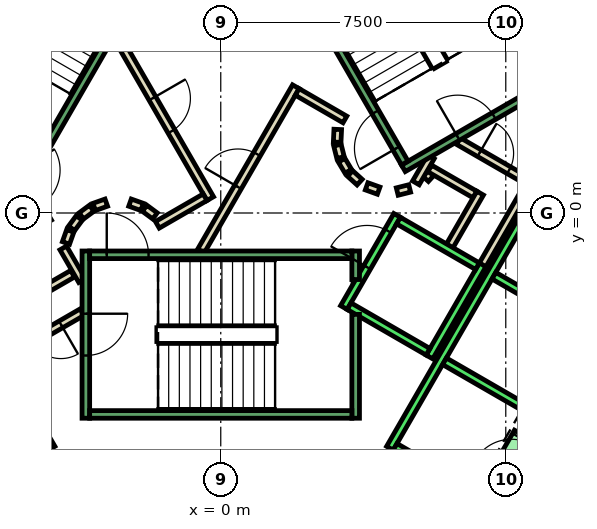
"""IFC4 building model, lengths in metres.
Left out: names, types, materials, properties, quantities, classifications, styles, units other than length and angle.
Written with IfcOpenShell. Run it as: python <this file> out.ifc"""

import sys

from ifc_helpers import new_model, si_unit, direction, frame, frame_2d, origin, place, context, subcontext, project, spatial, polyline, rectangle, outline, extrude, element, fill, save


model = new_model("IFC4")
c1 = context("Model", 3, precision=1e-05, world=origin(), true_north=direction((0.0, 1.0)))
c2 = subcontext(c1, "Body", "Model", "MODEL_VIEW")
j1 = project(units=[si_unit("LENGTHUNIT", "METRE"), si_unit("PLANEANGLEUNIT", "RADIAN")], contexts=[c1])
p1 = place(None, origin())
s1 = spatial("IfcSite", under=j1, at=p1, CompositionType="ELEMENT")
p2 = place(p1, origin())
s2 = spatial("IfcBuilding", under=s1, at=p2, CompositionType="ELEMENT")
p3 = place(p2, frame((0.0, 0.0, 138.2)))
s3 = spatial("IfcBuildingStorey", under=s2, at=p3, CompositionType="ELEMENT", Elevation=138.2)
p4 = place(p3, frame((0.0, 0.0, 3.6)))
e1 = element("IfcWall", 1, at=p4, inside=s3, PredefinedType="SHEAR", context=c2, shape_type="SweptSolid", body=[
    extrude(outline(polyline([(8.767, -6.314), (8.075, -5.914), (7.424, -7.04), (8.117, -7.44), (8.767, -6.314)])), origin(), (0.0, 0.0, 1.0), 0.2),
])
p5 = place(p3, frame((5.39, 0.898, 0.0), z_axis=(0.0, 0.0, 1.0), x_axis=(0.673828488714, 0.738887791073, 0.0)))
e2 = element("IfcWall", 2, at=p5, inside=s3, PredefinedType="PARTITIONING", context=c2, shape_type="SweptSolid", body=[
    extrude(rectangle(XDim=0.263, YDim=0.2, at=frame_2d((0.131, 0.0))), origin(), (0.0, 0.0, 1.0), 3.8),
])
p6 = place(p3, frame((5.499, 1.172, 0.0), z_axis=(0.0, 0.0, 1.0), x_axis=(0.866333505267, -0.499465972466, 0.0)))
e3 = element("IfcWall", 3, at=p6, inside=s3, PredefinedType="PARTITIONING", context=c2, shape_type="SweptSolid", body=[
    extrude(rectangle(XDim=1.374, YDim=0.2, at=frame_2d((0.687, 0.0))), origin(), (0.0, 0.0, 1.0), 3.8),
])
p7 = place(p3, frame((6.826, 0.522, 0.0), z_axis=(0.0, 0.0, 1.0), x_axis=(-0.500016722714, -0.866015748706, 0.0)))
e4 = element("IfcWall", 4, at=p7, inside=s3, PredefinedType="PARTITIONING", context=c2, shape_type="SweptSolid", body=[
    extrude(rectangle(XDim=1.7, YDim=0.2, at=frame_2d((0.85, 0.0))), origin(), (0.0, 0.0, 1.0), 3.8),
])
p8 = place(p3, frame((6.25, 1.894, 0.0), z_axis=(0.0, 0.0, 1.0), x_axis=(0.866043184279, -0.499969202016, 0.0)))
e5 = element("IfcWall", 5, at=p8, inside=s3, PredefinedType="PARTITIONING", context=c2, shape_type="SweptSolid", body=[
    extrude(rectangle(XDim=2.084, YDim=0.2, at=frame_2d((1.042, 0.0))), origin(), (0.0, 0.0, 1.0), 3.8),
])
p9 = place(p8, frame((0.642, 0.0, 0.0)))
e6 = element("IfcOpeningElement", 6, at=p9, cuts=e5, PredefinedType="OPENING", context=c2, shape_type="SweptSolid", body=[
    extrude(rectangle(XDim=0.9, YDim=2.1, at=frame_2d((0.45, 1.05))), frame((0.0, 0.11, 0.0), z_axis=(0.0, -1.0, 0.0), x_axis=(1.0, 0.0, 0.0)), (0.0, 0.0, 1.0), 0.22),
])
p10 = place(p3, frame((8.192, 0.888, 0.0), z_axis=(0.0, 0.0, 1.0), x_axis=(-0.499940625693, -0.866059680843, 0.0)))
e7 = element("IfcWall", 7, at=p10, inside=s3, PredefinedType="PARTITIONING", context=c2, shape_type="SweptSolid", body=[
    extrude(rectangle(XDim=2.68, YDim=0.2, at=frame_2d((1.34, 0.0))), origin(), (0.0, 0.0, 1.0), 3.8),
])
p11 = place(p3, frame((5.135, 0.793, 0.0), z_axis=(0.0, 0.0, 1.0), x_axis=(0.499526442893, 0.866298639529, 0.0)))
e8 = element("IfcWall", 8, at=p11, inside=s3, PredefinedType="PARTITIONING", context=c2, shape_type="SweptSolid", body=[
    extrude(rectangle(XDim=0.791, YDim=0.2, at=frame_2d((0.396, 0.0))), origin(), (0.0, 0.0, 1.0), 3.8),
])
p12 = place(p3, frame((-3.9, -1.599, 0.0), z_axis=(0.0, 0.0, 1.0), x_axis=(-0.865969445389, -0.500096910261, 0.0)))
e9 = element("IfcWall", 9, at=p12, inside=s3, PredefinedType="PARTITIONING", context=c2, shape_type="SweptSolid", body=[
    extrude(rectangle(XDim=1.373, YDim=0.2, at=frame_2d((0.687, 0.0))), origin(), (0.0, 0.0, 1.0), 3.8),
])
p13 = place(p3, frame((-3.65, -2.61, 0.0), z_axis=(0.0, 0.0, 1.0), x_axis=(-0.866072462134, -0.499918483688, 0.0)))
e10 = element("IfcWall", 10, at=p13, inside=s3, PredefinedType="PARTITIONING", context=c2, shape_type="SweptSolid", body=[
    extrude(rectangle(XDim=2.084, YDim=0.2, at=frame_2d((1.042, 0.0))), origin(), (0.0, 0.0, 1.0), 3.8),
])
p14 = place(p13, frame((0.642, 0.0, 0.0)))
e11 = element("IfcOpeningElement", 11, at=p14, cuts=e10, PredefinedType="OPENING", context=c2, shape_type="SweptSolid", body=[
    extrude(rectangle(XDim=0.9, YDim=2.1, at=frame_2d((0.45, 1.05))), frame((0.0, 0.11, 0.0), z_axis=(0.0, -1.0, 0.0), x_axis=(1.0, 0.0, 0.0)), (0.0, 0.0, 1.0), 0.22),
])
p15 = place(p3, frame((-4.145, -0.92, 0.0), z_axis=(0.0, 0.0, 1.0), x_axis=(0.499743786207, -0.866173278362, 0.0)))
e12 = element("IfcWall", 12, at=p15, inside=s3, PredefinedType="PARTITIONING", context=c2, shape_type="SweptSolid", body=[
    extrude(rectangle(XDim=0.991, YDim=0.2, at=frame_2d((0.495, 0.0))), origin(), (0.0, 0.0, 1.0), 3.8),
])
p16 = place(p3, frame((-0.52, -1.0, 0.0), z_axis=(0.0, 0.0, 1.0), x_axis=(0.50011622646, 0.865958290007, 0.0)))
e13 = element("IfcWall", 13, at=p16, inside=s3, PredefinedType="PARTITIONING", context=c2, shape_type="SweptSolid", body=[
    extrude(rectangle(XDim=4.991, YDim=0.2, at=frame_2d((2.496, 0.0))), origin(), (0.0, 0.0, 1.0), 3.8),
])
p17 = place(p16, frame((1.945, 0.0, 0.0)))
e14 = element("IfcOpeningElement", 14, at=p17, cuts=e13, PredefinedType="OPENING", context=c2, shape_type="SweptSolid", body=[
    extrude(rectangle(XDim=1.0, YDim=2.1, at=frame_2d((0.5, 1.05))), frame((0.0, 0.11, 0.0), z_axis=(0.0, -1.0, 0.0), x_axis=(1.0, 0.0, 0.0)), (0.0, 0.0, 1.0), 0.22),
])
p18 = place(p3, frame((2.012, 3.186, 0.0), z_axis=(0.0, 0.0, 1.0), x_axis=(0.865891012941, -0.500232699559, 0.0)))
e15 = element("IfcWall", 15, at=p18, inside=s3, PredefinedType="PARTITIONING", context=c2, shape_type="SweptSolid", body=[
    extrude(rectangle(XDim=1.449, YDim=0.2, at=frame_2d((0.725, 0.0))), origin(), (0.0, 0.0, 1.0), 3.8),
])
p19 = place(p3, frame((3.079, 2.199, 0.0), z_axis=(0.0, 0.0, 1.0), x_axis=(-0.047771483479, -0.998858290933, 0.0)))
e16 = element("IfcWall", 16, at=p19, inside=s3, PredefinedType="PARTITIONING", context=c2, shape_type="SweptSolid", body=[
    extrude(rectangle(XDim=0.337, YDim=0.2, at=frame_2d((0.169, 0.0))), origin(), (0.0, 0.0, 1.0), 3.8),
])
p20 = place(p3, frame((3.07, 1.786, 0.0), z_axis=(0.0, 0.0, 1.0), x_axis=(0.242705583207, -0.970099994784, 0.0)))
e17 = element("IfcWall", 17, at=p20, inside=s3, PredefinedType="PARTITIONING", context=c2, shape_type="SweptSolid", body=[
    extrude(rectangle(XDim=0.338, YDim=0.2, at=frame_2d((0.169, 0.0))), origin(), (0.0, 0.0, 1.0), 3.8),
])
for number, where, z_axis, x_axis in (
    (18, (3.182, 1.388, 0.0), (0.0, 0.0, 1.0), (0.512, -0.859, 0.0)),
    (19, (3.404, 1.039, 0.0), (0.0, 0.0, 1.0), (0.74, -0.672, 0.0)),
):
    element("IfcWall", number, at=place(p3, frame(where, z_axis=z_axis, x_axis=x_axis)), inside=s3, PredefinedType="PARTITIONING", context=c2, shape_type="SweptSolid", body=[
        extrude(rectangle(XDim=0.338, YDim=0.2, at=frame_2d((0.169, 0.0))), origin(), (0.0, 0.0, 1.0), 3.8),
    ])
p21 = place(p3, frame((3.838, 0.702, 0.0), z_axis=(0.0, 0.0, 1.0), x_axis=(0.941035081519, -0.338308993895, 0.0)))
e20 = element("IfcWall", 20, at=p21, inside=s3, PredefinedType="PARTITIONING", context=c2, shape_type="SweptSolid", body=[
    extrude(rectangle(XDim=0.337, YDim=0.2, at=frame_2d((0.168, 0.0))), origin(), (0.0, 0.0, 1.0), 3.8),
])
p22 = place(p3, frame((4.644, 0.564, 0.0), z_axis=(0.0, 0.0, 1.0), x_axis=(0.969929076366, 0.243387729394, 0.0)))
e21 = element("IfcWall", 21, at=p22, inside=s3, PredefinedType="PARTITIONING", context=c2, shape_type="SweptSolid", body=[
    extrude(rectangle(XDim=0.337, YDim=0.2, at=frame_2d((0.168, 0.0))), origin(), (0.0, 0.0, 1.0), 3.8),
])
p23 = place(p3, frame((-2.771, 4.7, 0.0), z_axis=(0.0, 0.0, 1.0), x_axis=(0.499969479948, -0.866043023828, 0.0)))
e22 = element("IfcWall", 22, at=p23, inside=s3, PredefinedType="PARTITIONING", context=c2, shape_type="SweptSolid", body=[
    extrude(rectangle(XDim=4.99, YDim=0.2, at=frame_2d((2.495, 0.0))), origin(), (0.0, 0.0, 1.0), 3.8),
])
p24 = place(p23, frame((1.945, 0.0, 0.0)))
e23 = element("IfcOpeningElement", 23, at=p24, cuts=e22, PredefinedType="OPENING", context=c2, shape_type="SweptSolid", body=[
    extrude(rectangle(XDim=1.0, YDim=2.1, at=frame_2d((0.5, 1.05))), frame((0.0, 0.11, 0.0), z_axis=(0.0, -1.0, 0.0), x_axis=(1.0, 0.0, 0.0)), (0.0, 0.0, 1.0), 0.22),
])
p25 = place(p3, frame((-0.412, 0.414, 0.0), z_axis=(0.0, 0.0, 1.0), x_axis=(-0.866017369001, -0.500013916395, 0.0)))
e24 = element("IfcWall", 24, at=p25, inside=s3, PredefinedType="PARTITIONING", context=c2, shape_type="SweptSolid", body=[
    extrude(rectangle(XDim=1.45, YDim=0.2, at=frame_2d((0.725, 0.0))), origin(), (0.0, 0.0, 1.0), 3.8),
])
p26 = place(p3, frame((-1.731, -0.077, 0.0), z_axis=(0.0, 0.0, 1.0), x_axis=(-0.804311165252, 0.594208338422, 0.0)))
e25 = element("IfcWall", 25, at=p26, inside=s3, PredefinedType="PARTITIONING", context=c2, shape_type="SweptSolid", body=[
    extrude(rectangle(XDim=0.338, YDim=0.2, at=frame_2d((0.169, 0.0))), origin(), (0.0, 0.0, 1.0), 3.8),
])
p27 = place(p3, frame((-2.07, 0.16, 0.0), z_axis=(0.0, 0.0, 1.0), x_axis=(-0.942199461132, 0.335052496547, 0.0)))
e26 = element("IfcWall", 26, at=p27, inside=s3, PredefinedType="PARTITIONING", context=c2, shape_type="SweptSolid", body=[
    extrude(rectangle(XDim=0.337, YDim=0.2, at=frame_2d((0.169, 0.0))), origin(), (0.0, 0.0, 1.0), 3.8),
])
p28 = place(p3, frame((-3.012, 0.273, 0.0), z_axis=(0.0, 0.0, 1.0), x_axis=(-0.942280615813, -0.334824194261, 0.0)))
e27 = element("IfcWall", 27, at=p28, inside=s3, PredefinedType="PARTITIONING", context=c2, shape_type="SweptSolid", body=[
    extrude(rectangle(XDim=0.338, YDim=0.2, at=frame_2d((0.169, 0.0))), origin(), (0.0, 0.0, 1.0), 3.8),
])
p29 = place(p3, frame((-3.397, 0.124, 0.0), z_axis=(0.0, 0.0, 1.0), x_axis=(-0.804311165252, -0.594208338422, 0.0)))
e28 = element("IfcWall", 28, at=p29, inside=s3, PredefinedType="PARTITIONING", context=c2, shape_type="SweptSolid", body=[
    extrude(rectangle(XDim=0.338, YDim=0.2, at=frame_2d((0.169, 0.0))), origin(), (0.0, 0.0, 1.0), 3.8),
])
p30 = place(p3, frame((-3.723, -0.131, 0.0), z_axis=(0.0, 0.0, 1.0), x_axis=(-0.594675113454, -0.803966112121, 0.0)))
e29 = element("IfcWall", 29, at=p30, inside=s3, PredefinedType="PARTITIONING", context=c2, shape_type="SweptSolid", body=[
    extrude(rectangle(XDim=0.338, YDim=0.2, at=frame_2d((0.169, 0.0))), origin(), (0.0, 0.0, 1.0), 3.8),
])
p31 = place(p3, frame((-3.96, -0.47, 0.0), z_axis=(0.0, 0.0, 1.0), x_axis=(-0.334824194261, -0.942280615813, 0.0)))
e30 = element("IfcWall", 30, at=p31, inside=s3, PredefinedType="PARTITIONING", context=c2, shape_type="SweptSolid", body=[
    extrude(rectangle(XDim=0.338, YDim=0.2, at=frame_2d((0.169, 0.0))), origin(), (0.0, 0.0, 1.0), 3.8),
])
p32 = place(p3, frame((-9.751, 2.99, 0.0), z_axis=(0.0, 0.0, 1.0), x_axis=(0.50000090737, -0.866024879913, 0.0)))
e31 = element("IfcWall", 31, at=p32, inside=s3, PredefinedType="STANDARD", context=c2, shape_type="SweptSolid", body=[
    extrude(rectangle(XDim=10.6, YDim=0.2, at=frame_2d((5.3, 0.0))), origin(), (0.0, 0.0, 1.0), 3.8),
])
p33 = place(p3, frame((3.24, -2.488, 0.0), z_axis=(0.0, 0.0, 1.0), x_axis=(0.49994636267, 0.866056369097, 0.0)))
e32 = element("IfcWall", 32, at=p33, inside=s3, PredefinedType="STANDARD", context=c2, shape_type="SweptSolid", body=[
    extrude(rectangle(XDim=2.8, YDim=0.2, at=frame_2d((1.4, 0.0))), origin(), (0.0, 0.0, 1.0), 3.8),
])
p34 = place(p33, frame((1.225, 0.0, 0.0)))
e33 = element("IfcOpeningElement", 33, at=p34, cuts=e32, PredefinedType="OPENING", context=c2, shape_type="SweptSolid", body=[
    extrude(rectangle(XDim=1.1, YDim=2.1, at=frame_2d((0.55, 1.05))), frame((0.0, 0.11, 0.0), z_axis=(0.0, -1.0, 0.0), x_axis=(1.0, 0.0, 0.0)), (0.0, 0.0, 1.0), 0.22),
])
p35 = place(p3, frame((5.492, -3.788, 0.0), z_axis=(0.0, 0.0, 1.0), x_axis=(0.500011755427, 0.866018616679, 0.0)))
e34 = element("IfcWall", 34, at=p35, inside=s3, PredefinedType="STANDARD", context=c2, shape_type="SweptSolid", body=[
    extrude(rectangle(XDim=2.8, YDim=0.2, at=frame_2d((1.4, 0.0))), origin(), (0.0, 0.0, 1.0), 3.8),
])
p36 = place(p3, frame((3.377, -2.452, 0.0), z_axis=(0.0, 0.0, 1.0), x_axis=(0.865955154139, -0.50012165622, 0.0)))
e35 = element("IfcWall", 35, at=p36, inside=s3, PredefinedType="STANDARD", context=c2, shape_type="SweptSolid", body=[
    extrude(rectangle(XDim=2.4, YDim=0.2, at=frame_2d((1.2, 0.0))), origin(), (0.0, 0.0, 1.0), 3.8),
])
p37 = place(p3, frame((4.677, -0.2, 0.0), z_axis=(0.0, 0.0, 1.0), x_axis=(0.865973769406, -0.500089422704, 0.0)))
e36 = element("IfcWall", 36, at=p37, inside=s3, PredefinedType="STANDARD", context=c2, shape_type="SweptSolid", body=[
    extrude(rectangle(XDim=2.399, YDim=0.2, at=frame_2d((1.2, 0.0))), origin(), (0.0, 0.0, 1.0), 3.8),
])
p38 = place(p3, frame((4.451, -6.19, 0.0), z_axis=(0.0, 0.0, 1.0), x_axis=(0.50000090737, 0.866024879913, 0.0)))
e37 = element("IfcWall", 37, at=p38, inside=s3, PredefinedType="STANDARD", context=c2, shape_type="SweptSolid", body=[
    extrude(rectangle(XDim=10.6, YDim=0.2, at=frame_2d((5.3, 0.0))), origin(), (0.0, 0.0, 1.0), 3.8),
])
for number, where, z_axis, x_axis in (
    (38, (4.588, -6.153, 0.0), (0.0, 0.0, 1.0), (0.866, -0.5, 0.0)),
    (39, (5.888, -3.902, 0.0), (0.0, 0.0, 1.0), (0.866, -0.5, 0.0)),
    (40, (7.188, -1.65, 0.0), (0.0, 0.0, 1.0), (0.866, -0.5, 0.0)),
):
    element("IfcWall", number, at=place(p3, frame(where, z_axis=z_axis, x_axis=x_axis)), inside=s3, PredefinedType="STANDARD", context=c2, shape_type="SweptSolid", body=[
        extrude(rectangle(XDim=2.5, YDim=0.2, at=frame_2d((1.25, 0.0))), origin(), (0.0, 0.0, 1.0), 3.8),
    ])
p39 = place(p3, frame((7.598, -7.14, 0.0), z_axis=(0.0, 0.0, 1.0), x_axis=(0.500362116554, 0.865816234728, 0.0)))
e41 = element("IfcWall", 41, at=p39, inside=s3, PredefinedType="STANDARD", context=c2, shape_type="SweptSolid", body=[
    extrude(rectangle(XDim=1.299, YDim=1.2, at=frame_2d((0.65, 0.0))), origin(), (0.0, 0.0, 1.0), 2.4),
])
p40 = place(p39, frame((0.1, 0.0, 0.0)))
e42 = element("IfcOpeningElement", 42, at=p40, cuts=e41, PredefinedType="OPENING", context=c2, shape_type="SweptSolid", body=[
    extrude(rectangle(XDim=1.1, YDim=2.3, at=frame_2d((0.55, 1.15))), frame((0.0, 0.61, 0.0), z_axis=(0.0, -1.0, 0.0), x_axis=(1.0, 0.0, 0.0)), (0.0, 0.0, 1.0), 1.22),
])
p41 = place(p3, frame((-3.55, -1.0, 0.0), z_axis=(0.0, 0.0, 1.0), x_axis=(0.0, -1.0, 0.0)))
e43 = element("IfcWall", 43, at=p41, inside=s3, PredefinedType="STANDARD", context=c2, shape_type="SweptSolid", body=[
    extrude(rectangle(XDim=4.4, YDim=0.2, at=frame_2d((2.2, 0.0))), origin(), (0.0, 0.0, 1.0), 3.8),
])
p42 = place(p41, frame((1.65, 0.0, 0.0)))
e44 = element("IfcOpeningElement", 44, at=p42, cuts=e43, PredefinedType="OPENING", context=c2, shape_type="SweptSolid", body=[
    extrude(rectangle(XDim=1.1, YDim=2.2, at=frame_2d((0.55, 1.1))), frame((0.0, 0.11, 0.0), z_axis=(0.0, -1.0, 0.0), x_axis=(1.0, 0.0, 0.0)), (0.0, 0.0, 1.0), 0.22),
])
p43 = place(p3, frame((3.55, -2.667, 0.0), z_axis=(0.0, 0.0, 1.0), x_axis=(0.0, -1.0, 0.0)))
e45 = element("IfcWall", 45, at=p43, inside=s3, PredefinedType="STANDARD", context=c2, shape_type="SweptSolid", body=[
    extrude(rectangle(XDim=2.733, YDim=0.2, at=frame_2d((1.366, 0.0))), origin(), (0.0, 0.0, 1.0), 3.8),
])
p44 = place(p3, frame((3.55, -1.0, 0.0), z_axis=(0.0, 0.0, 1.0), x_axis=(0.0, -1.0, 0.0)))
e46 = element("IfcWall", 46, at=p44, inside=s3, PredefinedType="STANDARD", context=c2, shape_type="SweptSolid", body=[
    extrude(rectangle(XDim=0.751, YDim=0.2, at=frame_2d((0.375, 0.0))), origin(), (0.0, 0.0, 1.0), 3.8),
])
p45 = place(p3, frame((-3.45, -1.1, 0.0), z_axis=(0.0, 0.0, 1.0), x_axis=(1.0, 0.0, 0.0)))
e47 = element("IfcWall", 47, at=p45, inside=s3, PredefinedType="STANDARD", context=c2, shape_type="SweptSolid", body=[
    extrude(rectangle(XDim=6.9, YDim=0.2, at=frame_2d((3.45, 0.0))), origin(), (0.0, 0.0, 1.0), 3.8),
])
p46 = place(p45, frame((0.45, 0.0, 0.0)))
e48 = element("IfcOpeningElement", 48, at=p46, cuts=e47, PredefinedType="OPENING", context=c2, shape_type="SweptSolid", body=[
    extrude(rectangle(XDim=1.1, YDim=2.2, at=frame_2d((0.55, 1.1))), frame((0.0, 0.11, 0.0), z_axis=(0.0, -1.0, 0.0), x_axis=(1.0, 0.0, 0.0)), (0.0, 0.0, 1.0), 0.22),
])
p47 = place(p3, frame((-3.45, -5.3, 0.0), z_axis=(0.0, 0.0, 1.0), x_axis=(1.0, 0.0, 0.0)))
e49 = element("IfcWall", 49, at=p47, inside=s3, PredefinedType="STANDARD", context=c2, shape_type="SweptSolid", body=[
    extrude(rectangle(XDim=6.9, YDim=0.2, at=frame_2d((3.45, 0.0))), origin(), (0.0, 0.0, 1.0), 3.8),
])
p48 = place(p3, frame((4.806, 1.176, 0.0), z_axis=(0.0, 0.0, 1.0), x_axis=(0.866059941101, 0.499940174841, 0.0)))
e50 = element("IfcWall", 50, at=p48, inside=s3, PredefinedType="STANDARD", context=c2, shape_type="SweptSolid", body=[
    extrude(rectangle(XDim=4.4, YDim=0.2, at=frame_2d((2.2, 0.0))), origin(), (0.0, 0.0, 1.0), 3.8),
])
p49 = place(p48, frame((1.65, 0.0, 0.0)))
e51 = element("IfcOpeningElement", 51, at=p49, cuts=e50, PredefinedType="OPENING", context=c2, shape_type="SweptSolid", body=[
    extrude(rectangle(XDim=1.1, YDim=2.2, at=frame_2d((0.55, 1.1))), frame((0.0, 0.11, 0.0), z_axis=(0.0, -1.0, 0.0), x_axis=(1.0, 0.0, 0.0)), (0.0, 0.0, 1.0), 0.22),
])
p50 = place(p3, frame((4.843, 1.312, 0.0), z_axis=(0.0, 0.0, 1.0), x_axis=(-0.499963383562, 0.866046543262, 0.0)))
e52 = element("IfcWall", 52, at=p50, inside=s3, PredefinedType="STANDARD", context=c2, shape_type="SweptSolid", body=[
    extrude(rectangle(XDim=6.9, YDim=0.2, at=frame_2d((3.45, 0.0))), origin(), (0.0, 0.0, 1.0), 3.8),
])
p51 = place(p50, frame((0.45, 0.0, 0.0)))
e53 = element("IfcOpeningElement", 53, at=p51, cuts=e52, PredefinedType="OPENING", context=c2, shape_type="SweptSolid", body=[
    extrude(rectangle(XDim=1.1, YDim=2.2, at=frame_2d((0.55, 1.1))), frame((0.0, 0.11, 0.0), z_axis=(0.0, -1.0, 0.0), x_axis=(1.0, 0.0, 0.0)), (0.0, 0.0, 1.0), 0.22),
])
p52 = place(p3, frame((8.48, 3.412, 0.0), z_axis=(0.0, 0.0, 1.0), x_axis=(-0.499978703459, 0.866037698999, 0.0)))
e54 = element("IfcWall", 54, at=p52, inside=s3, PredefinedType="STANDARD", context=c2, shape_type="SweptSolid", body=[
    extrude(rectangle(XDim=6.9, YDim=0.2, at=frame_2d((3.45, 0.0))), origin(), (0.0, 0.0, 1.0), 3.8),
])
p53 = place(p3, frame((-1.393, 7.288, 0.0), z_axis=(0.0, 0.0, 1.0), x_axis=(-0.499963383562, -0.866046543262, 0.0)))
e55 = element("IfcWall", 55, at=p53, inside=s3, PredefinedType="STANDARD", context=c2, shape_type="SweptSolid", body=[
    extrude(rectangle(XDim=6.9, YDim=0.2, at=frame_2d((3.45, 0.0))), origin(), (0.0, 0.0, 1.0), 3.8),
])
p54 = place(p53, frame((0.45, 0.0, 0.0)))
e56 = element("IfcOpeningElement", 56, at=p54, cuts=e55, PredefinedType="OPENING", context=c2, shape_type="SweptSolid", body=[
    extrude(rectangle(XDim=1.1, YDim=2.2, at=frame_2d((0.55, 1.1))), frame((0.0, 0.11, 0.0), z_axis=(0.0, -1.0, 0.0), x_axis=(1.0, 0.0, 0.0)), (0.0, 0.0, 1.0), 0.22),
])
p55 = place(p17, origin())
e57 = element("IfcDoor", 57, at=p55, inside=s3, OperationType="SINGLE_SWING_LEFT", PredefinedType="DOOR", context=c2, shape_type="SweptSolid", body=[
    extrude(rectangle(XDim=1.0, YDim=2.1, at=frame_2d((0.5, 1.05))), frame((0.0, 0.025, 0.0), z_axis=(0.0, -1.0, 0.0), x_axis=(1.0, 0.0, 0.0)), (0.0, 0.0, 1.0), 0.05),
])
fill(e14, e57)
p56 = place(p24, origin())
e58 = element("IfcDoor", 58, at=p56, inside=s3, OperationType="SINGLE_SWING_RIGHT", PredefinedType="DOOR", context=c2, shape_type="SweptSolid", body=[
    extrude(rectangle(XDim=1.0, YDim=2.1, at=frame_2d((0.5, 1.05))), frame((0.0, 0.025, 0.0), z_axis=(0.0, -1.0, 0.0), x_axis=(1.0, 0.0, 0.0)), (0.0, 0.0, 1.0), 0.05),
])
fill(e23, e58)
p57 = place(p9, origin())
e59 = element("IfcDoor", 59, at=p57, inside=s3, OperationType="SINGLE_SWING_LEFT", PredefinedType="DOOR", context=c2, shape_type="SweptSolid", body=[
    extrude(rectangle(XDim=0.9, YDim=2.1, at=frame_2d((0.45, 1.05))), frame((0.0, 0.025, 0.0), z_axis=(0.0, -1.0, 0.0), x_axis=(1.0, 0.0, 0.0)), (0.0, 0.0, 1.0), 0.05),
])
fill(e6, e59)
p58 = place(p14, origin())
e60 = element("IfcDoor", 60, at=p58, inside=s3, OperationType="SINGLE_SWING_LEFT", PredefinedType="DOOR", context=c2, shape_type="SweptSolid", body=[
    extrude(rectangle(XDim=0.9, YDim=2.1, at=frame_2d((0.45, 1.05))), frame((0.0, 0.025, 0.0), z_axis=(0.0, -1.0, 0.0), x_axis=(1.0, 0.0, 0.0)), (0.0, 0.0, 1.0), 0.05),
])
fill(e11, e60)
p59 = place(p40, origin())
e61 = element("IfcDoor", 61, at=p59, inside=s3, OperationType="SLIDING_TO_LEFT", PredefinedType="DOOR", context=c2, shape_type="SweptSolid", body=[
    extrude(rectangle(XDim=1.1, YDim=2.3, at=frame_2d((0.55, 1.15))), frame((0.0, 0.025, 0.0), z_axis=(0.0, -1.0, 0.0), x_axis=(1.0, 0.0, 0.0)), (0.0, 0.0, 1.0), 0.05),
])
fill(e42, e61)
p60 = place(p34, origin())
e62 = element("IfcDoor", 62, at=p60, inside=s3, OperationType="SLIDING_TO_LEFT", PredefinedType="DOOR", context=c2, shape_type="SweptSolid", body=[
    extrude(rectangle(XDim=1.1, YDim=2.1, at=frame_2d((0.55, 1.05))), frame((0.0, 0.025, 0.0), z_axis=(0.0, -1.0, 0.0), x_axis=(1.0, 0.0, 0.0)), (0.0, 0.0, 1.0), 0.05),
])
fill(e33, e62)
p61 = place(p46, origin())
e63 = element("IfcDoor", 63, at=p61, inside=s3, OperationType="SINGLE_SWING_LEFT", PredefinedType="DOOR", context=c2, shape_type="SweptSolid", body=[
    extrude(rectangle(XDim=1.1, YDim=2.2, at=frame_2d((0.55, 1.1))), frame((0.0, 0.025, 0.0), z_axis=(0.0, -1.0, 0.0), x_axis=(1.0, 0.0, 0.0)), (0.0, 0.0, 1.0), 0.05),
])
fill(e48, e63)
p62 = place(p42, origin())
e64 = element("IfcDoor", 64, at=p62, inside=s3, OperationType="SINGLE_SWING_LEFT", PredefinedType="DOOR", context=c2, shape_type="SweptSolid", body=[
    extrude(rectangle(XDim=1.1, YDim=2.2, at=frame_2d((0.55, 1.1))), frame((0.0, 0.025, 0.0), z_axis=(0.0, -1.0, 0.0), x_axis=(1.0, 0.0, 0.0)), (0.0, 0.0, 1.0), 0.05),
])
fill(e44, e64)
p63 = place(p51, origin())
e65 = element("IfcDoor", 65, at=p63, inside=s3, OperationType="SINGLE_SWING_LEFT", PredefinedType="DOOR", context=c2, shape_type="SweptSolid", body=[
    extrude(rectangle(XDim=1.1, YDim=2.2, at=frame_2d((0.55, 1.1))), frame((0.0, 0.025, 0.0), z_axis=(0.0, -1.0, 0.0), x_axis=(1.0, 0.0, 0.0)), (0.0, 0.0, 1.0), 0.05),
])
fill(e53, e65)
p64 = place(p49, origin())
e66 = element("IfcDoor", 66, at=p64, inside=s3, OperationType="SINGLE_SWING_LEFT", PredefinedType="DOOR", context=c2, shape_type="SweptSolid", body=[
    extrude(rectangle(XDim=1.1, YDim=2.2, at=frame_2d((0.55, 1.1))), frame((0.0, 0.025, 0.0), z_axis=(0.0, -1.0, 0.0), x_axis=(1.0, 0.0, 0.0)), (0.0, 0.0, 1.0), 0.05),
])
fill(e51, e66)
save(model, sys.argv[1])
